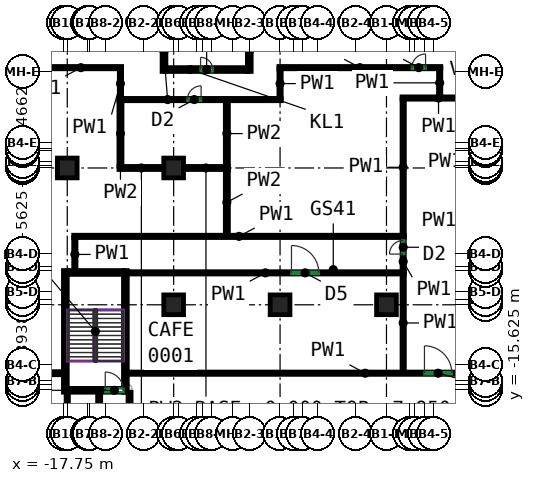
"""IFC4 building model, lengths in metres.
Left out: names, types, materials, properties, quantities, classifications, styles, units other than length and angle.
Written with IfcOpenShell. Run it as: python <this file> out.ifc"""

import sys

from ifc_helpers import new_model, si_unit, direction, frame, frame_2d, origin, origin_2d, place, context, subcontext, project, spatial, rectangle, extrude, source, transform, mapped, element, fill, save


model = new_model("IFC4")
c1 = context("Model", 3, precision=1e-05, world=origin(), true_north=direction((0.0, 1.0)))
c2 = subcontext(c1, "Body", "Model", "MODEL_VIEW")
j1 = project(units=[si_unit("LENGTHUNIT", "METRE"), si_unit("PLANEANGLEUNIT", "RADIAN")], contexts=[c1])
p1 = place(None, origin())
s1 = spatial("IfcSite", under=j1, at=p1, CompositionType="ELEMENT")
p2 = place(p1, origin())
s2 = spatial("IfcBuilding", under=s1, at=p2, CompositionType="ELEMENT")
p3 = place(p2, origin())
s3 = spatial("IfcBuildingStorey", under=s2, at=p3, CompositionType="ELEMENT", Elevation=0.0)
m1 = source(origin(), c2, "Body", "SweptSolid", [
    extrude(rectangle(XDim=1.3, YDim=1.3, at=origin_2d()), origin(), (0.0, 0.0, 1.0), 8.6),
])
for number, where, z_axis, x_axis in (
    (1, (-17.5, -1.0, 0.0), (0.0, 0.0, 1.0), (1.0, 0.0, 0.0)),
    (2, (-10.5, -10.0, 0.0), (0.0, 0.0, 1.0), (1.0, 0.0, 0.0)),
    (3, (-10.5, -1.0, 0.0), (0.0, 0.0, 1.0), (1.0, 0.0, 0.0)),
    (4, (-3.5, -10.0, 0.0), (0.0, 0.0, 1.0), (1.0, 0.0, 0.0)),
    (5, (3.5, -10.0, 0.0), (0.0, 0.0, 1.0), (1.0, 0.0, 0.0)),
):
    element("IfcColumn", number, at=place(p3, frame(where, z_axis=z_axis, x_axis=x_axis)), inside=s3, PredefinedType="COLUMN", context=c2, shape_type="MappedRepresentation", body=[
        mapped(m1, transform((0.0, 0.0, 0.0))),
    ])
m2 = source(origin(), c2, "Body", "SweptSolid", [
    extrude(rectangle(XDim=8.0, YDim=0.25, at=frame_2d((4.0, 0.0))), origin(), (0.0, 0.0, 1.0), 8.6),
])
for number, where, z_axis, x_axis in (
    (6, (-17.625, -15.75, 0.0), (0.0, 0.0, 1.0), (0.0, 1.0, 0.0)),
    (7, (-13.675, -15.75, 0.0), (0.0, 0.0, 1.0), (0.0, 1.0, 0.0)),
):
    element("IfcWall", number, at=place(p3, frame(where, z_axis=z_axis, x_axis=x_axis)), inside=s3, PredefinedType="SHEAR", context=c2, shape_type="MappedRepresentation", body=[
        mapped(m2, transform((0.0, 0.0, 0.0))),
    ])
m3 = source(origin(), c2, "Body", "SweptSolid", [
    extrude(rectangle(XDim=3.7, YDim=0.25, at=frame_2d((1.85, 0.0))), origin(), (0.0, 0.0, 1.0), 8.6),
])
p4 = place(p3, frame((-17.5, -15.625, 0.0), z_axis=(0.0, 0.0, 1.0), x_axis=(1.0, 0.0, 0.0)))
e8 = element("IfcWall", 8, at=p4, inside=s3, PredefinedType="SHEAR", context=c2, shape_type="MappedRepresentation", body=[
    mapped(m3, transform((0.0, 0.0, 0.0))),
])
p5 = place(p4, frame((2.5, 0.0, 0.0)))
e9 = element("IfcOpeningElement", 9, at=p5, cuts=e8, PredefinedType="OPENING", context=c2, shape_type="SweptSolid", body=[
    extrude(rectangle(XDim=1.2, YDim=2.1, at=frame_2d((0.6, 1.05))), frame((0.0, 0.135, 0.0), z_axis=(0.0, -1.0, 0.0), x_axis=(1.0, 0.0, 0.0)), (0.0, 0.0, 1.0), 0.27),
])
p6 = place(p3, frame((-17.5, -7.875, 0.0), z_axis=(0.0, 0.0, 1.0), x_axis=(1.0, 0.0, 0.0)))
e10 = element("IfcWall", 10, at=p6, inside=s3, PredefinedType="SHEAR", context=c2, shape_type="MappedRepresentation", body=[
    mapped(m3, transform((0.0, 0.0, 0.0))),
])
m4 = source(origin(), c2, "Body", "SweptSolid", [
    extrude(rectangle(XDim=11.95, YDim=0.2, at=frame_2d((5.975, 0.0))), origin(), (0.0, 0.0, 1.0), 8.6),
])
p7 = place(p3, frame((-15.4, -15.75, 0.0), z_axis=(0.0, 0.0, 1.0), x_axis=(0.0, -1.0, 0.0)))
e11 = element("IfcWall", 11, at=p7, inside=s3, PredefinedType="SHEAR", context=c2, shape_type="MappedRepresentation", body=[
    mapped(m4, transform((0.0, 0.0, 0.0))),
])
p8 = place(p7, frame((8.95, 0.0, 0.0)))
e12 = element("IfcOpeningElement", 12, at=p8, cuts=e11, PredefinedType="OPENING", context=c2, shape_type="SweptSolid", body=[
    extrude(rectangle(XDim=1.0, YDim=2.1, at=frame_2d((0.5, 1.05))), frame((0.0, 0.11, 0.0), z_axis=(0.0, -1.0, 0.0), x_axis=(1.0, 0.0, 0.0)), (0.0, 0.0, 1.0), 0.22),
])
p9 = place(p3, frame((-13.4, -15.75, 0.0), z_axis=(0.0, 0.0, 1.0), x_axis=(0.0, -1.0, 0.0)))
e13 = element("IfcWall", 13, at=p9, inside=s3, PredefinedType="SHEAR", context=c2, shape_type="MappedRepresentation", body=[
    mapped(m4, transform((0.0, 0.0, 0.0))),
])
m5 = source(origin(), c2, "Body", "SweptSolid", [
    extrude(rectangle(XDim=2.65, YDim=0.25, at=frame_2d((1.325, 0.0))), origin(), (0.0, 0.0, 1.0), 8.6),
])
for number, where, z_axis, x_axis in (
    (14, (-11.135, 5.35, 0.0), (0.0, 0.0, 1.0), (0.0, 1.0, 0.0)),
    (15, (-5.525, 5.35, 0.0), (0.0, 0.0, 1.0), (0.0, 1.0, 0.0)),
):
    element("IfcWall", number, at=place(p3, frame(where, z_axis=z_axis, x_axis=x_axis)), inside=s3, PredefinedType="PARTITIONING", context=c2, shape_type="MappedRepresentation", body=[
        mapped(m5, transform((0.0, 0.0, 0.0))),
    ])
m6 = source(origin(), c2, "Body", "SweptSolid", [
    extrude(rectangle(XDim=5.36, YDim=0.25, at=frame_2d((2.68, 0.0))), origin(), (0.0, 0.0, 1.0), 8.6),
])
p10 = place(p3, frame((-11.01, 5.475, 0.0), z_axis=(0.0, 0.0, 1.0), x_axis=(1.0, 0.0, 0.0)))
e16 = element("IfcWall", 16, at=p10, inside=s3, PredefinedType="PARTITIONING", context=c2, shape_type="MappedRepresentation", body=[
    mapped(m6, transform((0.0, 0.0, 0.0))),
])
p11 = place(p10, frame((2.28, 0.0, 0.0)))
e17 = element("IfcOpeningElement", 17, at=p11, cuts=e16, PredefinedType="OPENING", context=c2, shape_type="SweptSolid", body=[
    extrude(rectangle(XDim=0.8, YDim=2.0, at=frame_2d((0.4, 1.0))), frame((0.0, 0.135, 0.0), z_axis=(0.0, -1.0, 0.0), x_axis=(1.0, 0.0, 0.0)), (0.0, 0.0, 1.0), 0.27),
])
p12 = place(p3, frame((-13.6, -14.5, 0.0), z_axis=(0.0, 0.0, 1.0), x_axis=(1.0, 0.0, 0.0)))
e18 = element("IfcWall", 18, at=p12, inside=s3, PredefinedType="PARTITIONING", context=c2, shape_type="SweptSolid", body=[
    extrude(rectangle(XDim=31.4, YDim=0.15, at=frame_2d((15.7, 0.0))), origin(), (0.0, 0.0, 1.0), 8.6),
])
p13 = place(p12, frame((19.599, 0.0, 0.0)))
e19 = element("IfcOpeningElement", 19, at=p13, cuts=e18, PredefinedType="OPENING", context=c2, shape_type="SweptSolid", body=[
    extrude(rectangle(XDim=1.8, YDim=2.1, at=frame_2d((0.9, 1.05))), frame((0.0, 0.085, 0.0), z_axis=(0.0, -1.0, 0.0), x_axis=(1.0, 0.0, 0.0)), (0.0, 0.0, 1.0), 0.17),
])
p14 = place(p3, frame((-17.5, -18.35, 0.0), z_axis=(0.0, 0.0, 1.0), x_axis=(0.0, 1.0, 0.0)))
e20 = element("IfcWall", 20, at=p14, inside=s3, PredefinedType="PARTITIONING", context=c2, shape_type="SweptSolid", body=[
    extrude(rectangle(XDim=2.65, YDim=0.15, at=frame_2d((1.325, 0.0))), origin(), (0.0, 0.0, 1.0), 8.6),
])
p15 = place(p3, frame((4.6, -7.835, 0.0), z_axis=(0.0, 0.0, 1.0), x_axis=(0.0, 1.0, 0.0)))
e21 = element("IfcWall", 21, at=p15, inside=s3, PredefinedType="PARTITIONING", context=c2, shape_type="SweptSolid", body=[
    extrude(rectangle(XDim=2.27, YDim=0.15, at=frame_2d((1.135, 0.0))), origin(), (0.0, 0.0, 1.0), 8.6),
])
p16 = place(p15, frame((1.17, 0.0, 0.0)))
e22 = element("IfcOpeningElement", 22, at=p16, cuts=e21, PredefinedType="OPENING", context=c2, shape_type="SweptSolid", body=[
    extrude(rectangle(XDim=0.9, YDim=2.1, at=frame_2d((0.45, 1.05))), frame((0.0, 0.085, 0.0), z_axis=(0.0, -1.0, 0.0), x_axis=(1.0, 0.0, 0.0)), (0.0, 0.0, 1.0), 0.17),
])
p17 = place(p3, frame((4.6, -14.425, 0.0), z_axis=(0.0, 0.0, 1.0), x_axis=(0.0, 1.0, 0.0)))
e23 = element("IfcWall", 23, at=p17, inside=s3, PredefinedType="PARTITIONING", context=c2, shape_type="SweptSolid", body=[
    extrude(rectangle(XDim=6.459, YDim=0.15, at=frame_2d((3.229, 0.0))), origin(), (0.0, 0.0, 1.0), 8.6),
])
p18 = place(p3, frame((4.6, -5.434, 0.0), z_axis=(0.0, 0.0, 1.0), x_axis=(0.0, 1.0, 0.0)))
e24 = element("IfcWall", 24, at=p18, inside=s3, PredefinedType="PARTITIONING", context=c2, shape_type="SweptSolid", body=[
    extrude(rectangle(XDim=8.959, YDim=0.15, at=frame_2d((4.479, 0.0))), origin(), (0.0, 0.0, 1.0), 8.6),
])
p19 = place(p3, frame((4.525, 3.6, 0.0), z_axis=(0.0, 0.0, 1.0), x_axis=(1.0, 0.0, 0.0)))
e25 = element("IfcWall", 25, at=p19, inside=s3, PredefinedType="PARTITIONING", context=c2, shape_type="SweptSolid", body=[
    extrude(rectangle(XDim=4.8, YDim=0.15, at=frame_2d((2.4, 0.0))), origin(), (0.0, 0.0, 1.0), 8.6),
])
p20 = place(p3, frame((-17.0, -5.575, 0.0), z_axis=(0.0, 0.0, 1.0), x_axis=(0.0, -1.0, 0.0)))
e26 = element("IfcWall", 26, at=p20, inside=s3, PredefinedType="PARTITIONING", context=c2, shape_type="SweptSolid", body=[
    extrude(rectangle(XDim=2.225, YDim=0.15, at=frame_2d((1.113, 0.0))), origin(), (0.0, 0.0, 1.0), 8.6),
])
p21 = place(p3, frame((-17.075, -5.5, 0.0), z_axis=(0.0, 0.0, 1.0), x_axis=(1.0, 0.0, 0.0)))
e27 = element("IfcWall", 27, at=p21, inside=s3, PredefinedType="PARTITIONING", context=c2, shape_type="SweptSolid", body=[
    extrude(rectangle(XDim=21.75, YDim=0.15, at=frame_2d((10.875, 0.0))), origin(), (0.0, 0.0, 1.0), 8.6),
])
p22 = place(p3, frame((-13.6, -7.9, 0.0), z_axis=(0.0, 0.0, 1.0), x_axis=(1.0, 0.0, 0.0)))
e28 = element("IfcWall", 28, at=p22, inside=s3, PredefinedType="PARTITIONING", context=c2, shape_type="SweptSolid", body=[
    extrude(rectangle(XDim=18.275, YDim=0.15, at=frame_2d((9.138, 0.0))), origin(), (0.0, 0.0, 1.0), 8.6),
])
p23 = place(p22, frame((10.85, 0.0, 0.0)))
e29 = element("IfcOpeningElement", 29, at=p23, cuts=e28, PredefinedType="OPENING", context=c2, shape_type="SweptSolid", body=[
    extrude(rectangle(XDim=1.8, YDim=2.1, at=frame_2d((0.9, 1.05))), frame((0.0, 0.085, 0.0), z_axis=(0.0, -1.0, 0.0), x_axis=(1.0, 0.0, 0.0)), (0.0, 0.0, 1.0), 0.17),
])
p24 = place(p3, frame((-14.0, 5.525, 0.0), z_axis=(0.0, 0.0, 1.0), x_axis=(0.0, -1.0, 0.0)))
e30 = element("IfcWall", 30, at=p24, inside=s3, PredefinedType="PARTITIONING", context=c2, shape_type="SweptSolid", body=[
    extrude(rectangle(XDim=1.95, YDim=0.15, at=frame_2d((0.975, 0.0))), origin(), (0.0, 0.0, 1.0), 8.6),
])
p25 = place(p3, frame((-19.275, 5.6, 0.0), z_axis=(0.0, 0.0, 1.0), x_axis=(1.0, 0.0, 0.0)))
e31 = element("IfcWall", 31, at=p25, inside=s3, PredefinedType="PARTITIONING", context=c2, shape_type="SweptSolid", body=[
    extrude(rectangle(XDim=5.35, YDim=0.15, at=frame_2d((2.675, 0.0))), origin(), (0.0, 0.0, 1.0), 8.6),
])
p26 = place(p3, frame((-14.1, 3.5, 0.0), z_axis=(0.0, 0.0, 1.0), x_axis=(1.0, 0.0, 0.0)))
e32 = element("IfcWall", 32, at=p26, inside=s3, PredefinedType="PARTITIONING", context=c2, shape_type="SweptSolid", body=[
    extrude(rectangle(XDim=10.675, YDim=0.15, at=frame_2d((5.337, 0.0))), origin(), (0.0, 0.0, 1.0), 8.6),
])
p27 = place(p26, frame((4.507, 0.0, 0.0)))
e33 = element("IfcOpeningElement", 33, at=p27, cuts=e32, PredefinedType="OPENING", context=c2, shape_type="SweptSolid", body=[
    extrude(rectangle(XDim=0.9, YDim=2.1, at=frame_2d((0.45, 1.05))), frame((0.0, 0.085, 0.0), z_axis=(0.0, -1.0, 0.0), x_axis=(1.0, 0.0, 0.0)), (0.0, 0.0, 1.0), 0.17),
])
p28 = place(p3, frame((7.0, 5.525, 0.0), z_axis=(0.0, 0.0, 1.0), x_axis=(0.0, -1.0, 0.0)))
e34 = element("IfcWall", 34, at=p28, inside=s3, PredefinedType="PARTITIONING", context=c2, shape_type="SweptSolid", body=[
    extrude(rectangle(XDim=1.85, YDim=0.15, at=frame_2d((0.925, 0.0))), origin(), (0.0, 0.0, 1.0), 8.6),
])
p29 = place(p3, frame((-3.575, 5.6, 0.0), z_axis=(0.0, 0.0, 1.0), x_axis=(1.0, 0.0, 0.0)))
e35 = element("IfcWall", 35, at=p29, inside=s3, PredefinedType="PARTITIONING", context=c2, shape_type="SweptSolid", body=[
    extrude(rectangle(XDim=10.65, YDim=0.15, at=frame_2d((5.325, 0.0))), origin(), (0.0, 0.0, 1.0), 8.6),
])
p30 = place(p29, frame((8.746, 0.0, 0.0)))
e36 = element("IfcOpeningElement", 36, at=p30, cuts=e35, PredefinedType="OPENING", context=c2, shape_type="SweptSolid", body=[
    extrude(rectangle(XDim=0.9, YDim=2.1, at=frame_2d((0.45, 1.05))), frame((0.0, 0.085, 0.0), z_axis=(0.0, -1.0, 0.0), x_axis=(1.0, 0.0, 0.0)), (0.0, 0.0, 1.0), 0.17),
])
p31 = place(p3, frame((-3.5, 3.575, 0.0), z_axis=(0.0, 0.0, 1.0), x_axis=(0.0, 1.0, 0.0)))
e37 = element("IfcWall", 37, at=p31, inside=s3, PredefinedType="PARTITIONING", context=c2, shape_type="SweptSolid", body=[
    extrude(rectangle(XDim=1.95, YDim=0.15, at=frame_2d((0.975, 0.0))), origin(), (0.0, 0.0, 1.0), 8.6),
])
p32 = place(p3, frame((-17.7, -14.5, 0.0), z_axis=(0.0, 0.0, 1.0), x_axis=(-1.0, 0.0, 0.0)))
e38 = element("IfcWall", 38, at=p32, inside=s3, PredefinedType="PARTITIONING", context=c2, shape_type="SweptSolid", body=[
    extrude(rectangle(XDim=10.05, YDim=0.2, at=frame_2d((5.025, 0.0))), origin(), (0.0, 0.0, 1.0), 8.6),
])
p33 = place(p3, frame((-14.0, -0.898, 0.0), z_axis=(0.0, 0.0, 1.0), x_axis=(0.0, 1.0, 0.0)))
e39 = element("IfcWall", 39, at=p33, inside=s3, PredefinedType="PARTITIONING", context=c2, shape_type="SweptSolid", body=[
    extrude(rectangle(XDim=4.322, YDim=0.2, at=frame_2d((2.161, 0.0))), origin(), (0.0, 0.0, 1.0), 8.6),
])
p34 = place(p3, frame((-14.098, -1.0, 0.0), z_axis=(0.0, 0.0, 1.0), x_axis=(1.0, 0.0, 0.0)))
e40 = element("IfcWall", 40, at=p34, inside=s3, PredefinedType="PARTITIONING", context=c2, shape_type="SweptSolid", body=[
    extrude(rectangle(XDim=2.948, YDim=0.2, at=frame_2d((1.474, 0.0))), origin(), (0.0, 0.0, 1.0), 7.95),
])
p35 = place(p3, frame((-9.85, -1.0, 0.0), z_axis=(0.0, 0.0, 1.0), x_axis=(1.0, 0.0, 0.0)))
e41 = element("IfcWall", 41, at=p35, inside=s3, PredefinedType="PARTITIONING", context=c2, shape_type="SweptSolid", body=[
    extrude(rectangle(XDim=2.95, YDim=0.2, at=frame_2d((1.475, 0.0))), origin(), (0.0, 0.0, 1.0), 7.95),
])
for number, where, z_axis, x_axis in (
    (42, (-7.0, -5.424, 0.0), (0.0, 0.0, 1.0), (0.0, 1.0, 0.0)),
    (43, (-7.0, -0.9, 0.0), (0.0, 0.0, 1.0), (0.0, 1.0, 0.0)),
):
    element("IfcWall", number, at=place(p3, frame(where, z_axis=z_axis, x_axis=x_axis)), inside=s3, PredefinedType="PARTITIONING", context=c2, shape_type="SweptSolid", body=[
        extrude(rectangle(XDim=4.324, YDim=0.2, at=frame_2d((2.162, 0.0))), origin(), (0.0, 0.0, 1.0), 8.6),
    ])
p36 = place(p11, origin())
e44 = element("IfcDoor", 44, at=p36, inside=s3, OperationType="SINGLE_SWING_LEFT", PredefinedType="DOOR", context=c2, shape_type="SweptSolid", body=[
    extrude(rectangle(XDim=0.8, YDim=2.0, at=frame_2d((0.4, 1.0))), frame((0.0, 0.025, 0.0), z_axis=(0.0, -1.0, 0.0), x_axis=(1.0, 0.0, 0.0)), (0.0, 0.0, 1.0), 0.05),
])
fill(e17, e44)
p37 = place(p5, origin())
e45 = element("IfcDoor", 45, at=p37, inside=s3, OperationType="DOUBLE_DOOR_SINGLE_SWING", PredefinedType="DOOR", context=c2, shape_type="SweptSolid", body=[
    extrude(rectangle(XDim=1.2, YDim=2.1, at=frame_2d((0.6, 1.05))), frame((0.0, 0.025, 0.0), z_axis=(0.0, -1.0, 0.0), x_axis=(1.0, 0.0, 0.0)), (0.0, 0.0, 1.0), 0.05),
])
fill(e9, e45)
p38 = place(p13, origin())
e46 = element("IfcDoor", 46, at=p38, inside=s3, OperationType="DOUBLE_DOOR_SINGLE_SWING", PredefinedType="DOOR", context=c2, shape_type="SweptSolid", body=[
    extrude(rectangle(XDim=1.8, YDim=2.1, at=frame_2d((0.9, 1.05))), frame((0.0, 0.025, 0.0), z_axis=(0.0, -1.0, 0.0), x_axis=(1.0, 0.0, 0.0)), (0.0, 0.0, 1.0), 0.05),
])
fill(e19, e46)
p39 = place(p23, origin())
e47 = element("IfcDoor", 47, at=p39, inside=s3, OperationType="DOUBLE_DOOR_SINGLE_SWING", PredefinedType="DOOR", context=c2, shape_type="SweptSolid", body=[
    extrude(rectangle(XDim=1.8, YDim=2.1, at=frame_2d((0.9, 1.05))), frame((0.0, 0.025, 0.0), z_axis=(0.0, -1.0, 0.0), x_axis=(1.0, 0.0, 0.0)), (0.0, 0.0, 1.0), 0.05),
])
fill(e29, e47)
p40 = place(p16, origin())
e48 = element("IfcDoor", 48, at=p40, inside=s3, OperationType="SINGLE_SWING_LEFT", PredefinedType="DOOR", context=c2, shape_type="SweptSolid", body=[
    extrude(rectangle(XDim=0.9, YDim=2.1, at=frame_2d((0.45, 1.05))), frame((0.0, 0.025, 0.0), z_axis=(0.0, -1.0, 0.0), x_axis=(1.0, 0.0, 0.0)), (0.0, 0.0, 1.0), 0.05),
])
fill(e22, e48)
p41 = place(p27, origin())
e49 = element("IfcDoor", 49, at=p41, inside=s3, OperationType="SINGLE_SWING_RIGHT", PredefinedType="DOOR", context=c2, shape_type="SweptSolid", body=[
    extrude(rectangle(XDim=0.9, YDim=2.1, at=frame_2d((0.45, 1.05))), frame((0.0, 0.025, 0.0), z_axis=(0.0, -1.0, 0.0), x_axis=(1.0, 0.0, 0.0)), (0.0, 0.0, 1.0), 0.05),
])
fill(e33, e49)
p42 = place(p30, origin())
e50 = element("IfcDoor", 50, at=p42, inside=s3, OperationType="SINGLE_SWING_RIGHT", PredefinedType="DOOR", context=c2, shape_type="SweptSolid", body=[
    extrude(rectangle(XDim=0.9, YDim=2.1, at=frame_2d((0.45, 1.05))), frame((0.0, 0.025, 0.0), z_axis=(0.0, -1.0, 0.0), x_axis=(1.0, 0.0, 0.0)), (0.0, 0.0, 1.0), 0.05),
])
fill(e36, e50)
save(model, sys.argv[1])
